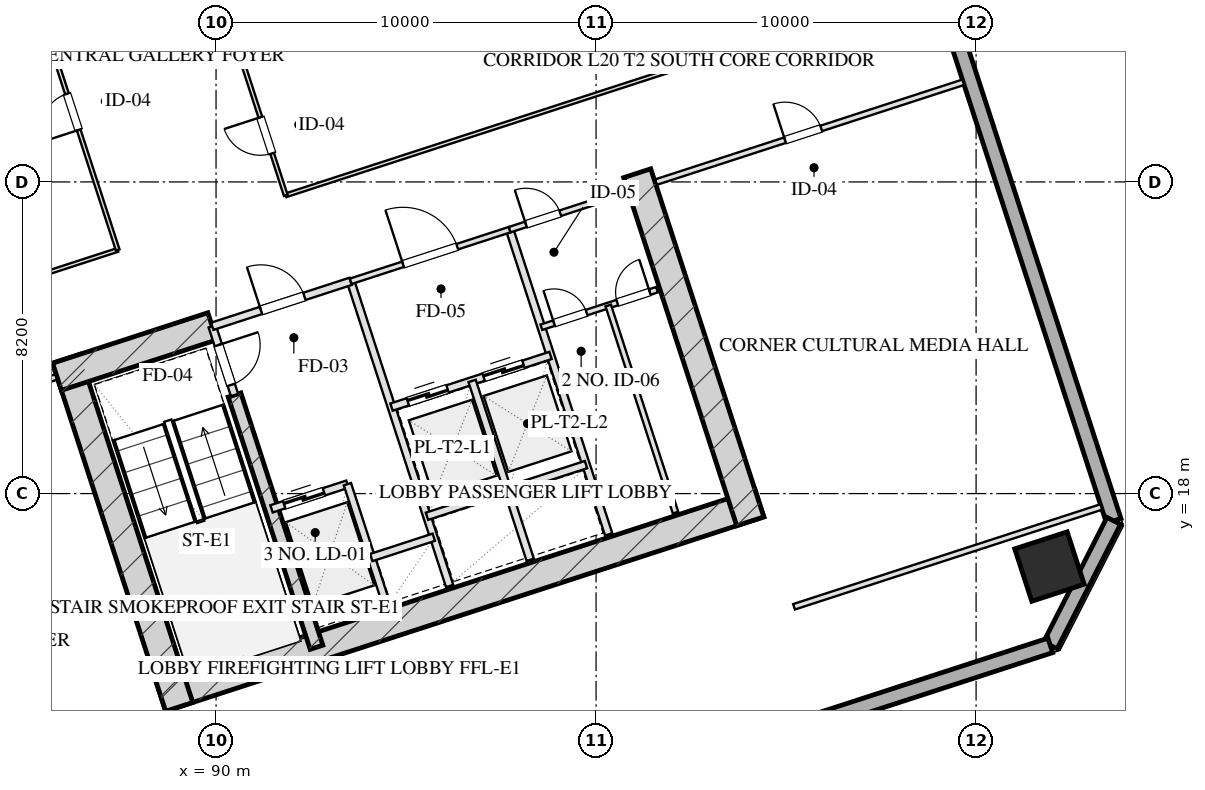
"""IFC4 building model, lengths in metres.
Left out: names, types, materials, properties, quantities, classifications, styles, units other than length and angle.
Written with IfcOpenShell. Run it as: python <this file> out.ifc"""

import sys

from ifc_helpers import new_model, si_unit, direction, frame, frame_2d, origin, origin_2d, place, context, subcontext, project, spatial, rectangle, hollow_rectangle, extrude, element, fill, save


model = new_model("IFC4")
c1 = context("Model", 3, precision=1e-05, world=origin(), true_north=direction((0.0, 1.0)))
c2 = subcontext(c1, "Body", "Model", "MODEL_VIEW")
j1 = project(units=[si_unit("LENGTHUNIT", "METRE"), si_unit("PLANEANGLEUNIT", "RADIAN")], contexts=[c1])
p1 = place(None, origin())
s1 = spatial("IfcSite", under=j1, at=p1, CompositionType="ELEMENT")
p2 = place(p1, origin())
s2 = spatial("IfcBuilding", under=s1, at=p2, CompositionType="ELEMENT")
p3 = place(p2, frame((0.0, 0.0, 81.65)))
s3 = spatial("IfcBuildingStorey", under=s2, at=p3, CompositionType="ELEMENT", Elevation=81.65)
p4 = place(p3, frame((88.559, 12.629, 0.0), z_axis=(0.0, 0.0, 1.0), x_axis=(0.951056072937, 0.309018358888, 0.0)))
e1 = element("IfcWall", 1, at=p4, inside=s3, PredefinedType="SHEAR", context=c2, shape_type="SweptSolid", body=[
    extrude(rectangle(XDim=16.55, YDim=0.75, at=frame_2d((8.275, 0.0))), origin(), (0.0, 0.0, 1.0), 3.45),
])
p5 = place(p3, frame((86.055, 21.546, 0.0), z_axis=(0.0, 0.0, 1.0), x_axis=(0.309023585745, -0.951054374604, 0.0)))
e2 = element("IfcWall", 2, at=p5, inside=s3, PredefinedType="SHEAR", context=c2, shape_type="SweptSolid", body=[
    extrude(rectangle(XDim=9.63, YDim=0.75, at=frame_2d((4.815, 0.0))), origin(), (0.0, 0.0, 1.0), 3.45),
])
p6 = place(p3, frame((101.082, 26.429, 0.0), z_axis=(0.0, 0.0, 1.0), x_axis=(0.309016134813, -0.951056795583, 0.0)))
e3 = element("IfcWall", 3, at=p6, inside=s3, PredefinedType="SHEAR", context=c2, shape_type="SweptSolid", body=[
    extrude(rectangle(XDim=9.63, YDim=0.75, at=frame_2d((4.815, 0.0))), origin(), (0.0, 0.0, 1.0), 3.45),
])
p7 = place(p3, frame((90.486, 20.594, 0.0), z_axis=(0.0, 0.0, 1.0), x_axis=(0.309020428229, -0.951055400562, 0.0)))
e4 = element("IfcWall", 4, at=p7, inside=s3, PredefinedType="SHEAR", context=c2, shape_type="SweptSolid", body=[
    extrude(rectangle(XDim=6.98, YDim=0.35, at=frame_2d((3.49, 0.0))), origin(), (0.0, 0.0, 1.0), 3.45),
])
p8 = place(p3, frame((85.814, 21.074, 0.0), z_axis=(0.0, 0.0, 1.0), x_axis=(0.95106580992, 0.308988390074, 0.0)))
e5 = element("IfcWall", 5, at=p8, inside=s3, PredefinedType="SHEAR", context=c2, shape_type="SweptSolid", body=[
    extrude(rectangle(XDim=4.295, YDim=0.75, at=frame_2d((2.147, 0.0))), origin(), (0.0, 0.0, 1.0), 3.45),
])
p9 = place(p3, frame((111.931, 16.08, 0.0), z_axis=(0.0, 0.0, 1.0), x_axis=(0.951056516295, 0.309016994375, 0.0)))
e6 = element("IfcColumn", 6, at=p9, inside=s3, PredefinedType="COLUMN", context=c2, shape_type="SweptSolid", body=[
    extrude(hollow_rectangle(XDim=1.45, YDim=1.45, WallThickness=0.05, at=origin_2d()), origin(), (0.0, 0.0, 1.0), 3.451),
])
p10 = place(p3, frame((99.284, 61.41, 0.0), z_axis=(0.0, 0.0, 1.0), x_axis=(0.309017542002, -0.95105633836, 0.0)))
e7 = element("IfcWall", 7, at=p10, inside=s3, PredefinedType="SOLIDWALL", context=c2, shape_type="SweptSolid", body=[
    extrude(rectangle(XDim=46.4, YDim=0.4, at=frame_2d((23.2, 0.0))), origin(), (0.0, 0.0, 1.0), 2.61),
])
p11 = place(p10, frame((25.25, 0.0, 0.0)))
e8 = element("IfcOpeningElement", 8, at=p11, cuts=e7, PredefinedType="OPENING", context=c2, shape_type="SweptSolid", body=[
    extrude(rectangle(XDim=1.1, YDim=2.15, at=frame_2d((0.55, 1.075))), frame((0.0, 0.21, 0.0), z_axis=(0.0, -1.0, 0.0), x_axis=(1.0, 0.0, 0.0)), (0.0, 0.0, 1.0), 0.42),
])
p12 = place(p3, frame((113.623, 17.281, 0.0), z_axis=(0.0, 0.0, 1.0), x_axis=(-0.454026238093, -0.890988313685, 0.0)))
e9 = element("IfcWall", 9, at=p12, inside=s3, PredefinedType="SOLIDWALL", context=c2, shape_type="SweptSolid", body=[
    extrude(rectangle(XDim=3.677, YDim=0.4, at=frame_2d((1.838, 0.0))), origin(), (0.0, 0.0, 1.0), 2.61),
])
p13 = place(p3, frame((111.953, 14.005, 0.0), z_axis=(0.0, 0.0, 1.0), x_axis=(-0.95105505922, -0.309021478754, 0.0)))
e10 = element("IfcWall", 10, at=p13, inside=s3, PredefinedType="SOLIDWALL", context=c2, shape_type="SweptSolid", body=[
    extrude(rectangle(XDim=29.4, YDim=0.4, at=frame_2d((14.7, 0.0))), origin(), (0.0, 0.0, 1.0), 2.61),
])
p14 = place(p3, frame((89.899, 22.401, 0.0), z_axis=(0.0, 0.0, 1.0), x_axis=(0.308932062672, -0.951084108086, 0.0)))
e11 = element("IfcWall", 11, at=p14, inside=s3, PredefinedType="PARTITIONING", context=c2, shape_type="SweptSolid", body=[
    extrude(rectangle(XDim=1.9, YDim=0.2, at=frame_2d((0.95, 0.0))), origin(), (0.0, 0.0, 1.0), 3.175),
])
p15 = place(p14, frame((0.52, 0.0, 0.0)))
e12 = element("IfcOpeningElement", 12, at=p15, cuts=e11, PredefinedType="OPENING", context=c2, shape_type="SweptSolid", body=[
    extrude(rectangle(XDim=1.1, YDim=2.05, at=frame_2d((0.55, 1.025))), frame((0.0, 0.11, 0.0), z_axis=(0.0, -1.0, 0.0), x_axis=(1.0, 0.0, 0.0)), (0.0, 0.0, 1.0), 0.22),
])
p16 = place(p3, frame((93.542, 23.585, 0.0), z_axis=(0.0, 0.0, 1.0), x_axis=(0.309042196757, -0.951048327176, 0.0)))
e13 = element("IfcWall", 13, at=p16, inside=s3, PredefinedType="PARTITIONING", context=c2, shape_type="SweptSolid", body=[
    extrude(rectangle(XDim=8.43, YDim=0.2, at=frame_2d((4.215, 0.0))), origin(), (0.0, 0.0, 1.0), 3.175),
])
p17 = place(p3, frame((89.899, 22.401, 0.0), z_axis=(0.0, 0.0, 1.0), x_axis=(0.951046716504, 0.309047153403, 0.0)))
e14 = element("IfcWall", 14, at=p17, inside=s3, PredefinedType="PARTITIONING", context=c2, shape_type="SweptSolid", body=[
    extrude(rectangle(XDim=3.83, YDim=0.2, at=frame_2d((1.915, 0.0))), origin(), (0.0, 0.0, 1.0), 3.175),
])
p18 = place(p17, frame((1.35, 0.0, 0.0)))
e15 = element("IfcOpeningElement", 15, at=p18, cuts=e14, PredefinedType="OPENING", context=c2, shape_type="SweptSolid", body=[
    extrude(rectangle(XDim=1.2, YDim=2.05, at=frame_2d((0.6, 1.025))), frame((0.0, 0.11, 0.0), z_axis=(0.0, -1.0, 0.0), x_axis=(1.0, 0.0, 0.0)), (0.0, 0.0, 1.0), 0.22),
])
p19 = place(p3, frame((91.46, 17.598, 0.0), z_axis=(0.0, 0.0, 1.0), x_axis=(0.951062257173, 0.308999325213, 0.0)))
e16 = element("IfcWall", 16, at=p19, inside=s3, PredefinedType="PARTITIONING", context=c2, shape_type="SweptSolid", body=[
    extrude(rectangle(XDim=2.1, YDim=0.2, at=frame_2d((1.05, 0.0))), origin(), (0.0, 0.0, 1.0), 3.175),
])
p20 = place(p19, frame((0.35, 0.0, 0.0)))
e17 = element("IfcOpeningElement", 17, at=p20, cuts=e16, PredefinedType="OPENING", context=c2, shape_type="SweptSolid", body=[
    extrude(rectangle(XDim=1.1, YDim=2.05, at=frame_2d((0.55, 1.025))), frame((0.0, 0.11, 0.0), z_axis=(0.0, -1.0, 0.0), x_axis=(1.0, 0.0, 0.0)), (0.0, 0.0, 1.0), 0.22),
])
p21 = place(p3, frame((93.457, 18.247, 0.0), z_axis=(0.0, 0.0, 1.0), x_axis=(0.3089935693, -0.951064127245, 0.0)))
e18 = element("IfcWall", 18, at=p21, inside=s3, PredefinedType="PARTITIONING", context=c2, shape_type="SweptSolid", body=[
    extrude(rectangle(XDim=3.7, YDim=0.2, at=frame_2d((1.85, 0.0))), origin(), (0.0, 0.0, 1.0), 3.175),
])
p22 = place(p3, frame((94.084, 16.317, 0.0), z_axis=(0.0, 0.0, 1.0), x_axis=(0.951041328149, 0.309063734775, 0.0)))
e19 = element("IfcWall", 19, at=p22, inside=s3, PredefinedType="PARTITIONING", context=c2, shape_type="SweptSolid", body=[
    extrude(rectangle(XDim=1.73, YDim=0.2, at=frame_2d((0.865, 0.0))), origin(), (0.0, 0.0, 1.0), 3.175),
])
p23 = place(p3, frame((97.727, 24.944, 0.0), z_axis=(0.0, 0.0, 1.0), x_axis=(0.309016001439, -0.951056838919, 0.0)))
e20 = element("IfcWall", 20, at=p23, inside=s3, PredefinedType="PARTITIONING", context=c2, shape_type="SweptSolid", body=[
    extrude(rectangle(XDim=8.43, YDim=0.2, at=frame_2d((4.215, 0.0))), origin(), (0.0, 0.0, 1.0), 3.175),
])
p24 = place(p3, frame((93.542, 23.585, 0.0), z_axis=(0.0, 0.0, 1.0), x_axis=(0.951063829732, 0.308994485023, 0.0)))
e21 = element("IfcWall", 21, at=p24, inside=s3, PredefinedType="PARTITIONING", context=c2, shape_type="SweptSolid", body=[
    extrude(rectangle(XDim=4.4, YDim=0.15, at=frame_2d((2.2, 0.0))), origin(), (0.0, 0.0, 1.0), 3.175),
])
p25 = place(p24, frame((1.45, 0.0, 0.0)))
e22 = element("IfcOpeningElement", 22, at=p25, cuts=e21, PredefinedType="OPENING", context=c2, shape_type="SweptSolid", body=[
    extrude(rectangle(XDim=1.5, YDim=2.05, at=frame_2d((0.75, 1.025))), frame((0.0, 0.085, 0.0), z_axis=(0.0, -1.0, 0.0), x_axis=(1.0, 0.0, 0.0)), (0.0, 0.0, 1.0), 0.17),
])
p26 = place(p3, frame((94.617, 20.275, 0.0), z_axis=(0.0, 0.0, 1.0), x_axis=(0.951058531764, 0.30901079133, 0.0)))
e23 = element("IfcWall", 23, at=p26, inside=s3, PredefinedType="PARTITIONING", context=c2, shape_type="SweptSolid", body=[
    extrude(rectangle(XDim=4.4, YDim=0.2, at=frame_2d((2.2, 0.0))), origin(), (0.0, 0.0, 1.0), 3.175),
])
p27 = place(p26, frame((0.45, 0.0, 0.0)))
e24 = element("IfcOpeningElement", 24, at=p27, cuts=e23, PredefinedType="OPENING", context=c2, shape_type="SweptSolid", body=[
    extrude(rectangle(XDim=1.1, YDim=2.05, at=frame_2d((0.55, 1.025))), frame((0.0, 0.11, 0.0), z_axis=(0.0, -1.0, 0.0), x_axis=(1.0, 0.0, 0.0)), (0.0, 0.0, 1.0), 0.22),
])
p28 = place(p26, frame((2.55, 0.0, 0.0)))
e25 = element("IfcOpeningElement", 25, at=p28, cuts=e23, PredefinedType="OPENING", context=c2, shape_type="SweptSolid", body=[
    extrude(rectangle(XDim=1.1, YDim=2.05, at=frame_2d((0.55, 1.025))), frame((0.0, 0.11, 0.0), z_axis=(0.0, -1.0, 0.0), x_axis=(1.0, 0.0, 0.0)), (0.0, 0.0, 1.0), 0.22),
])
p29 = place(p3, frame((96.738, 20.964, 0.0), z_axis=(0.0, 0.0, 1.0), x_axis=(0.309042578481, -0.951048203135, 0.0)))
e26 = element("IfcWall", 26, at=p29, inside=s3, PredefinedType="PARTITIONING", context=c2, shape_type="SweptSolid", body=[
    extrude(rectangle(XDim=4.95, YDim=0.2, at=frame_2d((2.475, 0.0))), origin(), (0.0, 0.0, 1.0), 3.175),
])
p30 = place(p3, frame((95.551, 17.403, 0.0), z_axis=(0.0, 0.0, 1.0), x_axis=(0.951058531764, 0.30901079133, 0.0)))
e27 = element("IfcWall", 27, at=p30, inside=s3, PredefinedType="PARTITIONING", context=c2, shape_type="SweptSolid", body=[
    extrude(rectangle(XDim=4.4, YDim=0.2, at=frame_2d((2.2, 0.0))), origin(), (0.0, 0.0, 1.0), 3.175),
])
p31 = place(p3, frame((97.727, 24.944, 0.0), z_axis=(0.0, 0.0, 1.0), x_axis=(0.951036872128, 0.309077446369, 0.0)))
e28 = element("IfcWall", 28, at=p31, inside=s3, PredefinedType="PARTITIONING", context=c2, shape_type="SweptSolid", body=[
    extrude(rectangle(XDim=3.2, YDim=0.15, at=frame_2d((1.6, 0.0))), origin(), (0.0, 0.0, 1.0), 3.175),
])
p32 = place(p31, frame((0.45, 0.0, 0.0)))
e29 = element("IfcOpeningElement", 29, at=p32, cuts=e28, PredefinedType="OPENING", context=c2, shape_type="SweptSolid", body=[
    extrude(rectangle(XDim=0.95, YDim=2.05, at=frame_2d((0.475, 1.025))), frame((0.0, 0.085, 0.0), z_axis=(0.0, -1.0, 0.0), x_axis=(1.0, 0.0, 0.0)), (0.0, 0.0, 1.0), 0.17),
])
p33 = place(p3, frame((98.561, 22.376, 0.0), z_axis=(0.0, 0.0, 1.0), x_axis=(0.95104415986, 0.309055020985, 0.0)))
e30 = element("IfcWall", 30, at=p33, inside=s3, PredefinedType="PARTITIONING", context=c2, shape_type="SweptSolid", body=[
    extrude(rectangle(XDim=3.2, YDim=0.15, at=frame_2d((1.6, 0.0))), origin(), (0.0, 0.0, 1.0), 3.175),
])
p34 = place(p33, frame((0.35, 0.0, 0.0)))
e31 = element("IfcOpeningElement", 31, at=p34, cuts=e30, PredefinedType="OPENING", context=c2, shape_type="SweptSolid", body=[
    extrude(rectangle(XDim=0.9, YDim=2.05, at=frame_2d((0.45, 1.025))), frame((0.0, 0.085, 0.0), z_axis=(0.0, -1.0, 0.0), x_axis=(1.0, 0.0, 0.0)), (0.0, 0.0, 1.0), 0.17),
])
p35 = place(p33, frame((2.1, 0.0, 0.0)))
e32 = element("IfcOpeningElement", 32, at=p35, cuts=e30, PredefinedType="OPENING", context=c2, shape_type="SweptSolid", body=[
    extrude(rectangle(XDim=0.9, YDim=2.05, at=frame_2d((0.45, 1.025))), frame((0.0, 0.085, 0.0), z_axis=(0.0, -1.0, 0.0), x_axis=(1.0, 0.0, 0.0)), (0.0, 0.0, 1.0), 0.17),
])
p36 = place(p3, frame((100.32, 22.948, 0.0), z_axis=(0.0, 0.0, 1.0), x_axis=(0.309035009867, -0.951050662518, 0.0)))
e33 = element("IfcWall", 33, at=p36, inside=s3, PredefinedType="PARTITIONING", context=c2, shape_type="SweptSolid", body=[
    extrude(rectangle(XDim=5.73, YDim=0.15, at=frame_2d((2.865, 0.0))), origin(), (0.0, 0.0, 1.0), 3.175),
])
p37 = place(p3, frame((77.136, 18.254, 0.0), z_axis=(0.0, 0.0, 1.0), x_axis=(0.951057133767, 0.309015093986, 0.0)))
e34 = element("IfcWall", 34, at=p37, inside=s3, PredefinedType="PARTITIONING", context=c2, shape_type="SweptSolid", body=[
    extrude(rectangle(XDim=9.1, YDim=0.15, at=frame_2d((4.55, 0.0))), origin(), (0.0, 0.0, 1.0), 3.175),
])
p38 = place(p37, frame((3.822, 0.0, 0.0)))
e35 = element("IfcOpeningElement", 35, at=p38, cuts=e34, PredefinedType="OPENING", context=c2, shape_type="SweptSolid", body=[
    extrude(rectangle(XDim=1.0, YDim=2.05, at=frame_2d((0.5, 1.025))), frame((0.0, 0.085, 0.0), z_axis=(0.0, -1.0, 0.0), x_axis=(1.0, 0.0, 0.0)), (0.0, 0.0, 1.0), 0.17),
])
p39 = place(p3, frame((105.209, 15.021, 0.0), z_axis=(0.0, 0.0, 1.0), x_axis=(0.951054329824, 0.309023723562, 0.0)))
e36 = element("IfcWall", 36, at=p39, inside=s3, PredefinedType="PARTITIONING", context=c2, shape_type="SweptSolid", body=[
    extrude(rectangle(XDim=8.5, YDim=0.15, at=frame_2d((4.25, 0.0))), origin(), (0.0, 0.0, 1.0), 3.175),
])
p40 = place(p3, frame((101.578, 26.196, 0.0), z_axis=(0.0, 0.0, 1.0), x_axis=(0.951062770994, 0.308997743729, 0.0)))
e37 = element("IfcWall", 37, at=p40, inside=s3, PredefinedType="PARTITIONING", context=c2, shape_type="SweptSolid", body=[
    extrude(rectangle(XDim=8.5, YDim=0.15, at=frame_2d((4.25, 0.0))), origin(), (0.0, 0.0, 1.0), 3.175),
])
p41 = place(p40, frame((3.57, 0.0, 0.0)))
e38 = element("IfcOpeningElement", 38, at=p41, cuts=e37, PredefinedType="OPENING", context=c2, shape_type="SweptSolid", body=[
    extrude(rectangle(XDim=1.0, YDim=2.05, at=frame_2d((0.5, 1.025))), frame((0.0, 0.085, 0.0), z_axis=(0.0, -1.0, 0.0), x_axis=(1.0, 0.0, 0.0)), (0.0, 0.0, 1.0), 0.17),
])
p42 = place(p3, frame((76.308, 20.803, 0.0), z_axis=(0.0, 0.0, 1.0), x_axis=(0.951054504848, 0.309023184905, 0.0)))
e39 = element("IfcWall", 39, at=p42, inside=s3, PredefinedType="MOVABLE", context=c2, shape_type="SweptSolid", body=[
    extrude(rectangle(XDim=11.675, YDim=0.1, at=frame_2d((5.838, 0.0))), origin(), (0.0, 0.0, 1.0), 3.175),
])
p43 = place(p3, frame((91.834, 25.848, 0.0), z_axis=(0.0, 0.0, 1.0), x_axis=(0.951055746746, 0.309019362795, 0.0)))
e40 = element("IfcWall", 40, at=p43, inside=s3, PredefinedType="MOVABLE", context=c2, shape_type="SweptSolid", body=[
    extrude(rectangle(XDim=17.875, YDim=0.1, at=frame_2d((8.938, 0.0))), origin(), (0.0, 0.0, 1.0), 3.175),
])
p44 = place(p3, frame((87.412, 24.411, 0.0), z_axis=(0.0, 0.0, 1.0), x_axis=(-0.309022042254, 0.951054876125, 0.0)))
e41 = element("IfcWall", 41, at=p44, inside=s3, PredefinedType="MOVABLE", context=c2, shape_type="SweptSolid", body=[
    extrude(rectangle(XDim=16.64, YDim=0.1, at=frame_2d((8.32, 0.0))), origin(), (0.0, 0.0, 1.0), 3.175),
])
p45 = place(p44, frame((3.32, 0.0, 0.0)))
e42 = element("IfcOpeningElement", 42, at=p45, cuts=e41, PredefinedType="OPENING", context=c2, shape_type="SweptSolid", body=[
    extrude(rectangle(XDim=1.0, YDim=2.05, at=frame_2d((0.5, 1.025))), frame((0.0, 0.06, 0.0), z_axis=(0.0, -1.0, 0.0), x_axis=(1.0, 0.0, 0.0)), (0.0, 0.0, 1.0), 0.12),
])
p46 = place(p44, frame((11.64, 0.0, 0.0)))
e43 = element("IfcOpeningElement", 43, at=p46, cuts=e41, PredefinedType="OPENING", context=c2, shape_type="SweptSolid", body=[
    extrude(rectangle(XDim=1.0, YDim=2.05, at=frame_2d((0.5, 1.025))), frame((0.0, 0.06, 0.0), z_axis=(0.0, -1.0, 0.0), x_axis=(1.0, 0.0, 0.0)), (0.0, 0.0, 1.0), 0.12),
])
p47 = place(p3, frame((91.834, 25.848, 0.0), z_axis=(0.0, 0.0, 1.0), x_axis=(-0.30901773025, 0.951056277195, 0.0)))
e44 = element("IfcWall", 44, at=p47, inside=s3, PredefinedType="MOVABLE", context=c2, shape_type="SweptSolid", body=[
    extrude(rectangle(XDim=16.64, YDim=0.1, at=frame_2d((8.32, 0.0))), origin(), (0.0, 0.0, 1.0), 3.175),
])
p48 = place(p47, frame((1.16, 0.0, 0.0)))
e45 = element("IfcOpeningElement", 45, at=p48, cuts=e44, PredefinedType="OPENING", context=c2, shape_type="SweptSolid", body=[
    extrude(rectangle(XDim=1.0, YDim=2.05, at=frame_2d((0.5, 1.025))), frame((0.0, 0.06, 0.0), z_axis=(0.0, -1.0, 0.0), x_axis=(1.0, 0.0, 0.0)), (0.0, 0.0, 1.0), 0.12),
])
p49 = place(p47, frame((5.48, 0.0, 0.0)))
e46 = element("IfcOpeningElement", 46, at=p49, cuts=e44, PredefinedType="OPENING", context=c2, shape_type="SweptSolid", body=[
    extrude(rectangle(XDim=0.85, YDim=2.05, at=frame_2d((0.425, 1.025))), frame((0.0, 0.06, 0.0), z_axis=(0.0, -1.0, 0.0), x_axis=(1.0, 0.0, 0.0)), (0.0, 0.0, 1.0), 0.12),
])
p50 = place(p47, frame((8.08, 0.0, 0.0)))
e47 = element("IfcOpeningElement", 47, at=p50, cuts=e44, PredefinedType="OPENING", context=c2, shape_type="SweptSolid", body=[
    extrude(rectangle(XDim=1.0, YDim=2.05, at=frame_2d((0.5, 1.025))), frame((0.0, 0.06, 0.0), z_axis=(0.0, -1.0, 0.0), x_axis=(1.0, 0.0, 0.0)), (0.0, 0.0, 1.0), 0.12),
])
p51 = place(p47, frame((10.874, 0.0, 0.0)))
e48 = element("IfcOpeningElement", 48, at=p51, cuts=e44, PredefinedType="OPENING", context=c2, shape_type="SweptSolid", body=[
    extrude(rectangle(XDim=1.0, YDim=2.05, at=frame_2d((0.5, 1.025))), frame((0.0, 0.06, 0.0), z_axis=(0.0, -1.0, 0.0), x_axis=(1.0, 0.0, 0.0)), (0.0, 0.0, 1.0), 0.12),
])
p52 = place(p47, frame((14.174, 0.0, 0.0)))
e49 = element("IfcOpeningElement", 49, at=p52, cuts=e44, PredefinedType="OPENING", context=c2, shape_type="SweptSolid", body=[
    extrude(rectangle(XDim=1.05, YDim=2.05, at=frame_2d((0.525, 1.025))), frame((0.0, 0.06, 0.0), z_axis=(0.0, -1.0, 0.0), x_axis=(1.0, 0.0, 0.0)), (0.0, 0.0, 1.0), 0.12),
])
p53 = place(p15, origin())
e50 = element("IfcDoor", 50, at=p53, inside=s3, OperationType="SINGLE_SWING_LEFT", PredefinedType="DOOR", context=c2, shape_type="SweptSolid", body=[
    extrude(rectangle(XDim=1.1, YDim=2.05, at=frame_2d((0.55, 1.025))), frame((0.0, 0.025, 0.0), z_axis=(0.0, -1.0, 0.0), x_axis=(1.0, 0.0, 0.0)), (0.0, 0.0, 1.0), 0.05),
])
fill(e12, e50)
p54 = place(p18, origin())
e51 = element("IfcDoor", 51, at=p54, inside=s3, OperationType="SINGLE_SWING_LEFT", PredefinedType="DOOR", context=c2, shape_type="SweptSolid", body=[
    extrude(rectangle(XDim=1.2, YDim=2.05, at=frame_2d((0.6, 1.025))), frame((0.0, 0.025, 0.0), z_axis=(0.0, -1.0, 0.0), x_axis=(1.0, 0.0, 0.0)), (0.0, 0.0, 1.0), 0.05),
])
fill(e15, e51)
p55 = place(p20, origin())
e52 = element("IfcDoor", 52, at=p55, inside=s3, OperationType="DOUBLE_DOOR_SLIDING", PredefinedType="DOOR", context=c2, shape_type="SweptSolid", body=[
    extrude(rectangle(XDim=1.1, YDim=2.05, at=frame_2d((0.55, 1.025))), frame((0.0, 0.025, 0.0), z_axis=(0.0, -1.0, 0.0), x_axis=(1.0, 0.0, 0.0)), (0.0, 0.0, 1.0), 0.05),
])
fill(e17, e52)
p56 = place(p25, origin())
e53 = element("IfcDoor", 53, at=p56, inside=s3, OperationType="SINGLE_SWING_LEFT", PredefinedType="DOOR", context=c2, shape_type="SweptSolid", body=[
    extrude(rectangle(XDim=1.5, YDim=2.05, at=frame_2d((0.75, 1.025))), frame((0.0, 0.025, 0.0), z_axis=(0.0, -1.0, 0.0), x_axis=(1.0, 0.0, 0.0)), (0.0, 0.0, 1.0), 0.05),
])
fill(e22, e53)
p57 = place(p27, origin())
e54 = element("IfcDoor", 54, at=p57, inside=s3, OperationType="DOUBLE_DOOR_SLIDING", PredefinedType="DOOR", context=c2, shape_type="SweptSolid", body=[
    extrude(rectangle(XDim=1.1, YDim=2.05, at=frame_2d((0.55, 1.025))), frame((0.0, 0.025, 0.0), z_axis=(0.0, -1.0, 0.0), x_axis=(1.0, 0.0, 0.0)), (0.0, 0.0, 1.0), 0.05),
])
fill(e24, e54)
p58 = place(p28, origin())
e55 = element("IfcDoor", 55, at=p58, inside=s3, OperationType="DOUBLE_DOOR_SLIDING", PredefinedType="DOOR", context=c2, shape_type="SweptSolid", body=[
    extrude(rectangle(XDim=1.1, YDim=2.05, at=frame_2d((0.55, 1.025))), frame((0.0, 0.025, 0.0), z_axis=(0.0, -1.0, 0.0), x_axis=(1.0, 0.0, 0.0)), (0.0, 0.0, 1.0), 0.05),
])
fill(e25, e55)
p59 = place(p32, origin())
e56 = element("IfcDoor", 56, at=p59, inside=s3, OperationType="SINGLE_SWING_LEFT", PredefinedType="DOOR", context=c2, shape_type="SweptSolid", body=[
    extrude(rectangle(XDim=0.95, YDim=2.05, at=frame_2d((0.475, 1.025))), frame((0.0, 0.025, 0.0), z_axis=(0.0, -1.0, 0.0), x_axis=(1.0, 0.0, 0.0)), (0.0, 0.0, 1.0), 0.05),
])
fill(e29, e56)
p60 = place(p34, origin())
e57 = element("IfcDoor", 57, at=p60, inside=s3, OperationType="SINGLE_SWING_LEFT", PredefinedType="DOOR", context=c2, shape_type="SweptSolid", body=[
    extrude(rectangle(XDim=0.9, YDim=2.05, at=frame_2d((0.45, 1.025))), frame((0.0, 0.025, 0.0), z_axis=(0.0, -1.0, 0.0), x_axis=(1.0, 0.0, 0.0)), (0.0, 0.0, 1.0), 0.05),
])
fill(e31, e57)
p61 = place(p35, origin())
e58 = element("IfcDoor", 58, at=p61, inside=s3, OperationType="SINGLE_SWING_RIGHT", PredefinedType="DOOR", context=c2, shape_type="SweptSolid", body=[
    extrude(rectangle(XDim=0.9, YDim=2.05, at=frame_2d((0.45, 1.025))), frame((0.0, 0.025, 0.0), z_axis=(0.0, -1.0, 0.0), x_axis=(1.0, 0.0, 0.0)), (0.0, 0.0, 1.0), 0.05),
])
fill(e32, e58)
p62 = place(p41, origin())
e59 = element("IfcDoor", 59, at=p62, inside=s3, OperationType="SINGLE_SWING_LEFT", PredefinedType="DOOR", context=c2, shape_type="SweptSolid", body=[
    extrude(rectangle(XDim=1.0, YDim=2.05, at=frame_2d((0.5, 1.025))), frame((0.0, 0.025, 0.0), z_axis=(0.0, -1.0, 0.0), x_axis=(1.0, 0.0, 0.0)), (0.0, 0.0, 1.0), 0.05),
])
fill(e38, e59)
p63 = place(p45, origin())
e60 = element("IfcDoor", 60, at=p63, inside=s3, OperationType="SINGLE_SWING_LEFT", PredefinedType="DOOR", context=c2, shape_type="SweptSolid", body=[
    extrude(rectangle(XDim=1.0, YDim=2.05, at=frame_2d((0.5, 1.025))), frame((0.0, 0.025, 0.0), z_axis=(0.0, -1.0, 0.0), x_axis=(1.0, 0.0, 0.0)), (0.0, 0.0, 1.0), 0.05),
])
fill(e42, e60)
p64 = place(p48, origin())
e61 = element("IfcDoor", 61, at=p64, inside=s3, OperationType="SINGLE_SWING_RIGHT", PredefinedType="DOOR", context=c2, shape_type="SweptSolid", body=[
    extrude(rectangle(XDim=1.0, YDim=2.05, at=frame_2d((0.5, 1.025))), frame((0.0, 0.025, 0.0), z_axis=(0.0, -1.0, 0.0), x_axis=(1.0, 0.0, 0.0)), (0.0, 0.0, 1.0), 0.05),
])
fill(e45, e61)
save(model, sys.argv[1])
